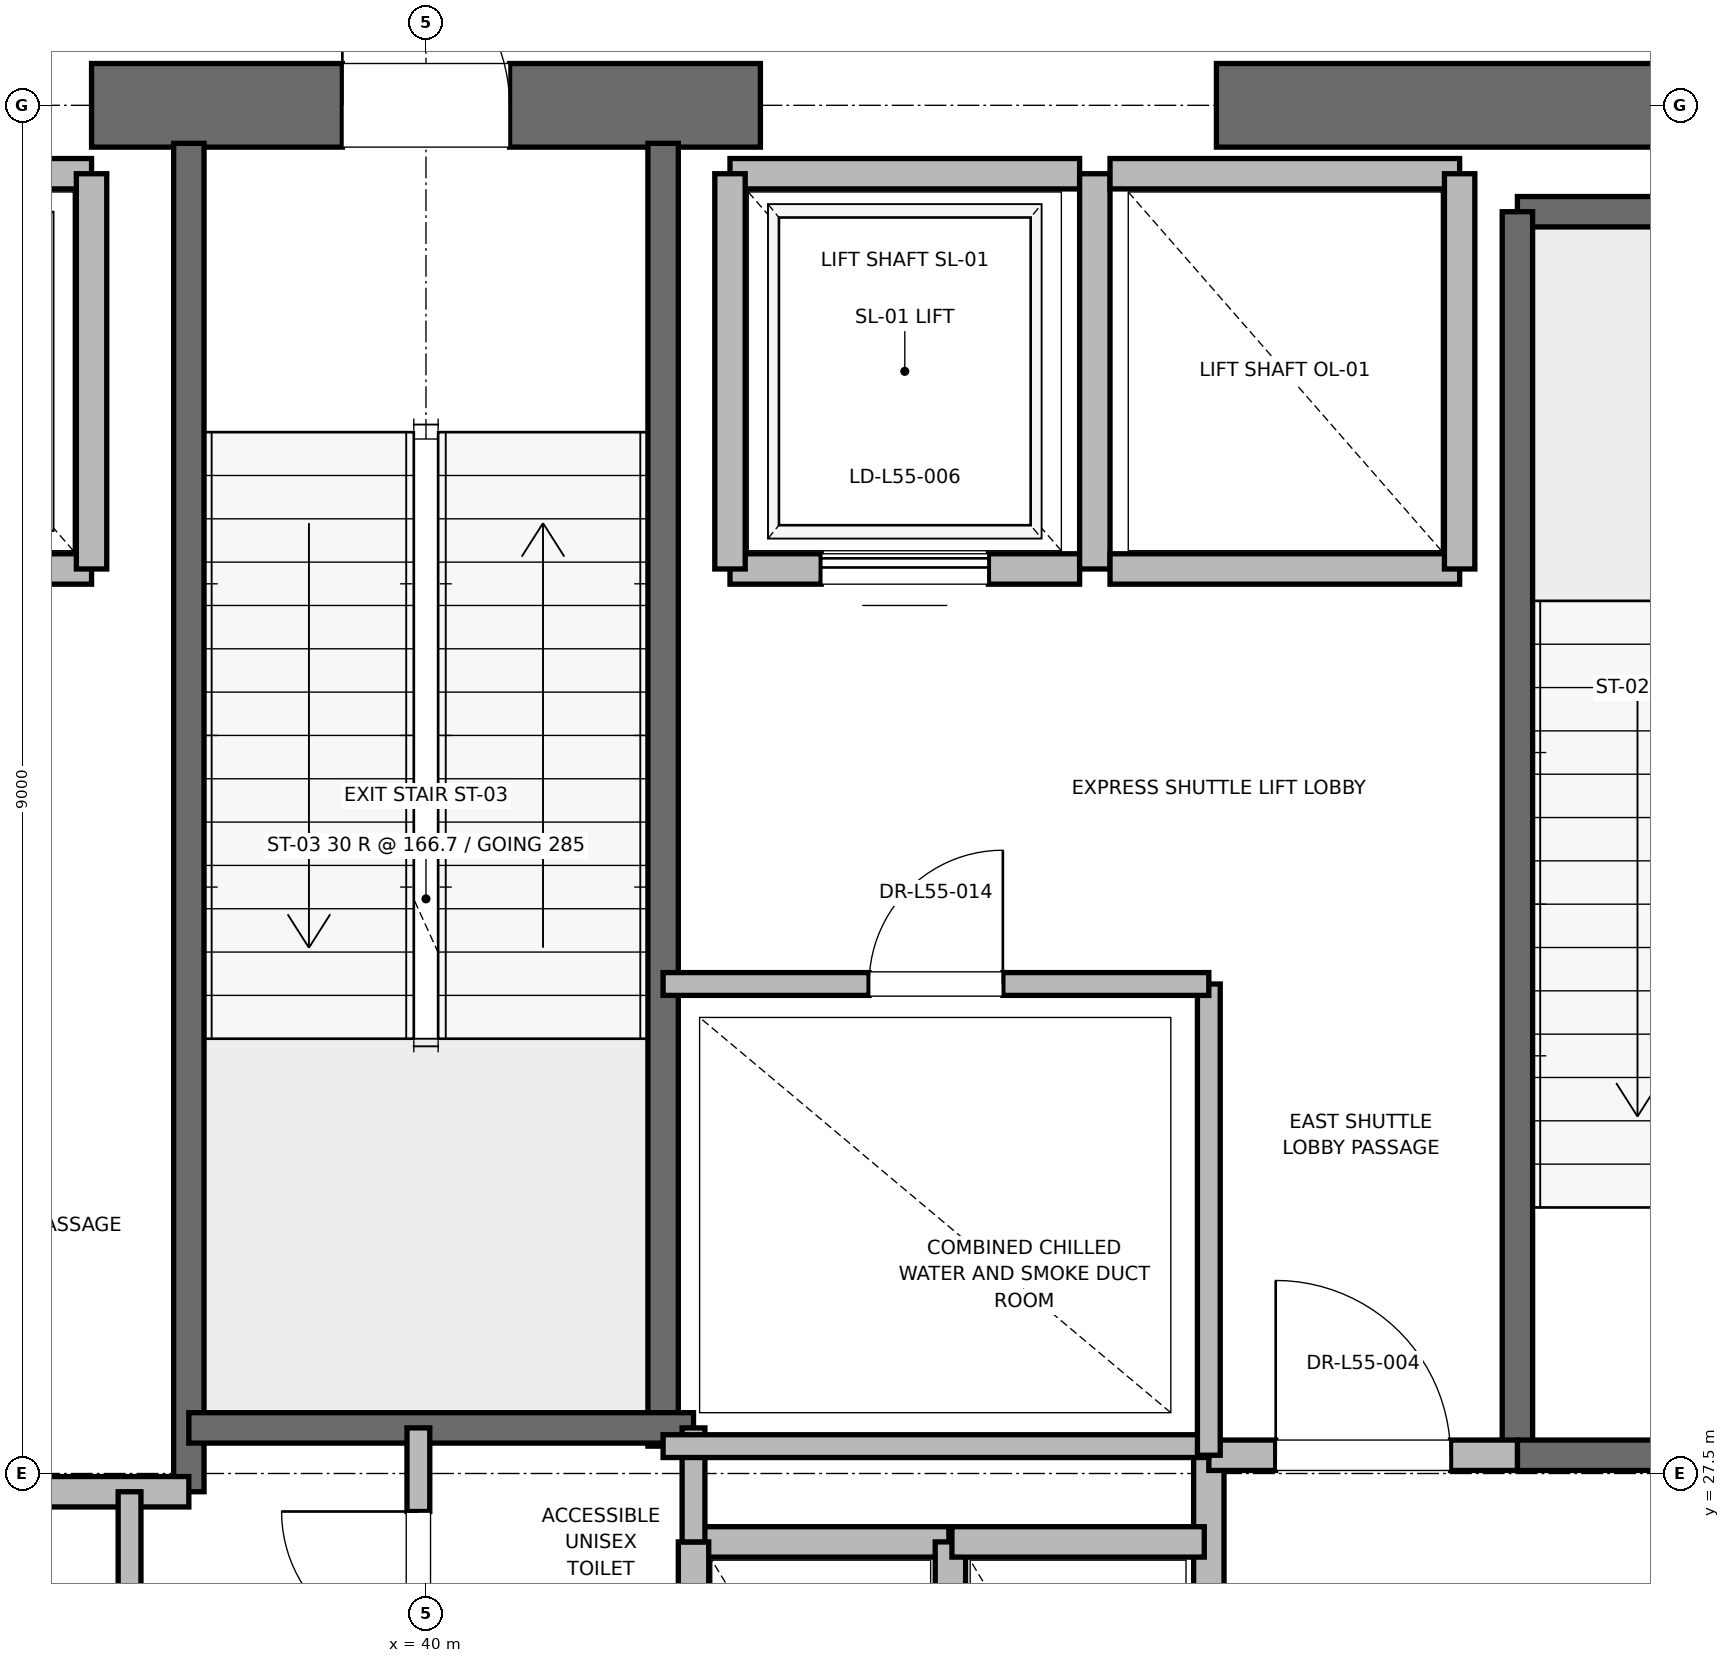
"""IFC4 building model, lengths in metres.
Left out: names, types, materials, properties, quantities, classifications, styles, units other than length and angle.
Written with IfcOpenShell. Run it as: python <this file> out.ifc"""

import sys

from ifc_helpers import new_model, si_unit, direction, frame, frame_2d, origin, place, context, subcontext, project, spatial, rectangle, extrude, element, fill, save


model = new_model("IFC4")
c1 = context("Model", 3, precision=1e-05, world=origin(), true_north=direction((0.0, 1.0)))
c2 = subcontext(c1, "Body", "Model", "MODEL_VIEW")
j1 = project(units=[si_unit("LENGTHUNIT", "METRE"), si_unit("PLANEANGLEUNIT", "RADIAN")], contexts=[c1])
p1 = place(None, origin())
s1 = spatial("IfcSite", under=j1, at=p1, CompositionType="ELEMENT")
p2 = place(p1, origin())
s2 = spatial("IfcBuilding", under=s1, at=p2, CompositionType="ELEMENT")
p3 = place(p2, frame((0.0, 0.0, 238.2)))
s3 = spatial("IfcBuildingStorey", under=s2, at=p3, CompositionType="ELEMENT", Elevation=238.2)
p4 = place(p3, frame((37.8, 36.5, 0.0), z_axis=(0.0, 0.0, 1.0), x_axis=(1.0, 0.0, 0.0)))
e1 = element("IfcWall", 1, at=p4, inside=s3, PredefinedType="SHEAR", context=c2, shape_type="SweptSolid", body=[
    extrude(rectangle(XDim=4.4, YDim=0.55, at=frame_2d((2.2, 0.0))), origin(), (0.0, 0.0, 1.0), 4.785),
])
p5 = place(p4, frame((1.65, 0.0, 0.0)))
e2 = element("IfcOpeningElement", 2, at=p5, cuts=e1, PredefinedType="OPENING", context=c2, shape_type="SweptSolid", body=[
    extrude(rectangle(XDim=1.1, YDim=2.15, at=frame_2d((0.55, 1.075))), frame((0.0, 0.275, 0.0), z_axis=(0.0, -1.0, 0.0), x_axis=(1.0, 0.0, 0.0)), (0.0, 0.0, 1.0), 0.55),
])
p6 = place(p3, frame((45.2, 36.5, 0.0), z_axis=(0.0, 0.0, 1.0), x_axis=(1.0, 0.0, 0.0)))
e3 = element("IfcWall", 3, at=p6, inside=s3, PredefinedType="SHEAR", context=c2, shape_type="SweptSolid", body=[
    extrude(rectangle(XDim=5.8, YDim=0.55, at=frame_2d((2.9, 0.0))), origin(), (0.0, 0.0, 1.0), 4.785),
])
p7 = place(p3, frame((47.18, 35.8, 0.0), z_axis=(0.0, 0.0, 1.0), x_axis=(1.0, 0.0, 0.0)))
e4 = element("IfcWall", 4, at=p7, inside=s3, PredefinedType="SOLIDWALL", context=c2, shape_type="SweptSolid", body=[
    extrude(rectangle(XDim=3.12, YDim=0.2, at=frame_2d((1.56, 0.0))), origin(), (0.0, 0.0, 1.0), 4.785),
])
p8 = place(p3, frame((47.18, 27.62, 0.0), z_axis=(0.0, 0.0, 1.0), x_axis=(0.0, 1.0, 0.0)))
e5 = element("IfcWall", 5, at=p8, inside=s3, PredefinedType="SOLIDWALL", context=c2, shape_type="SweptSolid", body=[
    extrude(rectangle(XDim=8.18, YDim=0.2, at=frame_2d((4.09, 0.0))), origin(), (0.0, 0.0, 1.0), 4.785),
])
p9 = place(p3, frame((47.18, 27.62, 0.0), z_axis=(0.0, 0.0, 1.0), x_axis=(1.0, 0.0, 0.0)))
e6 = element("IfcWall", 6, at=p9, inside=s3, PredefinedType="SOLIDWALL", context=c2, shape_type="SweptSolid", body=[
    extrude(rectangle(XDim=3.12, YDim=0.2, at=frame_2d((1.56, 0.0))), origin(), (0.0, 0.0, 1.0), 4.785),
])
p10 = place(p9, frame((1.01, 0.0, 0.0)))
e7 = element("IfcOpeningElement", 7, at=p10, cuts=e6, PredefinedType="OPENING", context=c2, shape_type="SweptSolid", body=[
    extrude(rectangle(XDim=1.1, YDim=2.15, at=frame_2d((0.55, 1.075))), frame((0.0, 0.1, 0.0), z_axis=(0.0, -1.0, 0.0), x_axis=(1.0, 0.0, 0.0)), (0.0, 0.0, 1.0), 0.2),
])
p11 = place(p3, frame((38.44, 27.38, 0.0), z_axis=(0.0, 0.0, 1.0), x_axis=(0.0, 1.0, 0.0)))
e8 = element("IfcWall", 8, at=p11, inside=s3, PredefinedType="SOLIDWALL", context=c2, shape_type="SweptSolid", body=[
    extrude(rectangle(XDim=8.87, YDim=0.2, at=frame_2d((4.435, 0.0))), origin(), (0.0, 0.0, 1.0), 4.785),
])
p12 = place(p3, frame((41.56, 27.68, 0.0), z_axis=(0.0, 0.0, 1.0), x_axis=(0.0, 1.0, 0.0)))
e9 = element("IfcWall", 9, at=p12, inside=s3, PredefinedType="SOLIDWALL", context=c2, shape_type="SweptSolid", body=[
    extrude(rectangle(XDim=8.57, YDim=0.2, at=frame_2d((4.285, 0.0))), origin(), (0.0, 0.0, 1.0), 4.785),
])
p13 = place(p3, frame((38.44, 27.8, 0.0), z_axis=(0.0, 0.0, 1.0), x_axis=(1.0, 0.0, 0.0)))
e10 = element("IfcWall", 10, at=p13, inside=s3, PredefinedType="SOLIDWALL", context=c2, shape_type="SweptSolid", body=[
    extrude(rectangle(XDim=3.32, YDim=0.2, at=frame_2d((1.66, 0.0))), origin(), (0.0, 0.0, 1.0), 4.785),
])
p14 = place(p3, frame((32.82, 27.38, 0.0), z_axis=(0.0, 0.0, 1.0), x_axis=(1.0, 0.0, 0.0)))
e11 = element("IfcWall", 11, at=p14, inside=s3, PredefinedType="PARTITIONING", context=c2, shape_type="SweptSolid", body=[
    extrude(rectangle(XDim=5.62, YDim=0.2, at=frame_2d((2.81, 0.0))), origin(), (0.0, 0.0, 1.0), 4.785),
])
p15 = place(p3, frame((45.15, 24.25, 0.0), z_axis=(0.0, 0.0, 1.0), x_axis=(0.0, 1.0, 0.0)))
e12 = element("IfcWall", 12, at=p15, inside=s3, PredefinedType="PARTITIONING", context=c2, shape_type="SweptSolid", body=[
    extrude(rectangle(XDim=3.37, YDim=0.2, at=frame_2d((1.685, 0.0))), origin(), (0.0, 0.0, 1.0), 4.785),
])
p16 = place(p3, frame((45.15, 27.62, 0.0), z_axis=(0.0, 0.0, 1.0), x_axis=(1.0, 0.0, 0.0)))
e13 = element("IfcWall", 13, at=p16, inside=s3, PredefinedType="PARTITIONING", context=c2, shape_type="SweptSolid", body=[
    extrude(rectangle(XDim=2.03, YDim=0.2, at=frame_2d((1.015, 0.0))), origin(), (0.0, 0.0, 1.0), 4.785),
])
p17 = place(p16, frame((0.44, 0.0, 0.0)))
e14 = element("IfcOpeningElement", 14, at=p17, cuts=e13, PredefinedType="OPENING", context=c2, shape_type="SweptSolid", body=[
    extrude(rectangle(XDim=1.15, YDim=2.2, at=frame_2d((0.575, 1.1))), frame((0.0, 0.1, 0.0), z_axis=(0.0, -1.0, 0.0), x_axis=(1.0, 0.0, 0.0)), (0.0, 0.0, 1.0), 0.2),
])
p18 = place(p3, frame((43.44, 27.05, 0.0), z_axis=(0.0, 0.0, 1.0), x_axis=(-1.0, 0.0, 0.0)))
e15 = element("IfcWall", 15, at=p18, inside=s3, PredefinedType="SOLIDWALL", context=c2, shape_type="SweptSolid", body=[
    extrude(rectangle(XDim=1.68, YDim=0.2, at=frame_2d((0.84, 0.0))), origin(), (0.0, 0.0, 1.0), 4.785),
])
for number, where, z_axis, x_axis in (
    (16, (41.76, 27.05, 0.0), (0.0, 0.0, 1.0), (0.0, -1.0, 0.0)),
    (17, (43.45, 24.45, 0.0), (0.0, 0.0, 1.0), (0.0, 1.0, 0.0)),
):
    element("IfcWall", number, at=place(p3, frame(where, z_axis=z_axis, x_axis=x_axis)), inside=s3, PredefinedType="SOLIDWALL", context=c2, shape_type="SweptSolid", body=[
        extrude(rectangle(XDim=2.6, YDim=0.2, at=frame_2d((1.3, 0.0))), origin(), (0.0, 0.0, 1.0), 4.785),
    ])
p19 = place(p3, frame((45.12, 27.05, 0.0), z_axis=(0.0, 0.0, 1.0), x_axis=(-1.0, 0.0, 0.0)))
e18 = element("IfcWall", 18, at=p19, inside=s3, PredefinedType="SOLIDWALL", context=c2, shape_type="SweptSolid", body=[
    extrude(rectangle(XDim=1.66, YDim=0.2, at=frame_2d((0.83, 0.0))), origin(), (0.0, 0.0, 1.0), 4.785),
])
p20 = place(p3, frame((35.5, 33.45, 0.0), z_axis=(0.0, 0.0, 1.0), x_axis=(1.0, 0.0, 0.0)))
e19 = element("IfcWall", 19, at=p20, inside=s3, PredefinedType="SOLIDWALL", context=c2, shape_type="SweptSolid", body=[
    extrude(rectangle(XDim=2.3, YDim=0.2, at=frame_2d((1.15, 0.0))), origin(), (0.0, 0.0, 1.0), 4.785),
])
p21 = place(p20, frame((0.6, 0.0, 0.0)))
e20 = element("IfcOpeningElement", 20, at=p21, cuts=e19, PredefinedType="OPENING", context=c2, shape_type="SweptSolid", body=[
    extrude(rectangle(XDim=1.1, YDim=2.2, at=frame_2d((0.55, 1.1))), frame((0.0, 0.1, 0.0), z_axis=(0.0, -1.0, 0.0), x_axis=(1.0, 0.0, 0.0)), (0.0, 0.0, 1.0), 0.2),
])
p22 = place(p3, frame((37.8, 36.05, 0.0), z_axis=(0.0, 0.0, 1.0), x_axis=(-1.0, 0.0, 0.0)))
e21 = element("IfcWall", 21, at=p22, inside=s3, PredefinedType="SOLIDWALL", context=c2, shape_type="SweptSolid", body=[
    extrude(rectangle(XDim=2.3, YDim=0.2, at=frame_2d((1.15, 0.0))), origin(), (0.0, 0.0, 1.0), 3.765),
])
p23 = place(p3, frame((37.8, 33.45, 0.0), z_axis=(0.0, 0.0, 1.0), x_axis=(0.0, 1.0, 0.0)))
e22 = element("IfcWall", 22, at=p23, inside=s3, PredefinedType="SOLIDWALL", context=c2, shape_type="SweptSolid", body=[
    extrude(rectangle(XDim=2.6, YDim=0.2, at=frame_2d((1.3, 0.0))), origin(), (0.0, 0.0, 1.0), 3.765),
])
p24 = place(p3, frame((42.0, 33.45, 0.0), z_axis=(0.0, 0.0, 1.0), x_axis=(1.0, 0.0, 0.0)))
e23 = element("IfcWall", 23, at=p24, inside=s3, PredefinedType="SOLIDWALL", context=c2, shape_type="SweptSolid", body=[
    extrude(rectangle(XDim=2.3, YDim=0.2, at=frame_2d((1.15, 0.0))), origin(), (0.0, 0.0, 1.0), 4.785),
])
p25 = place(p24, frame((0.6, 0.0, 0.0)))
e24 = element("IfcOpeningElement", 24, at=p25, cuts=e23, PredefinedType="OPENING", context=c2, shape_type="SweptSolid", body=[
    extrude(rectangle(XDim=1.1, YDim=2.2, at=frame_2d((0.55, 1.1))), frame((0.0, 0.1, 0.0), z_axis=(0.0, -1.0, 0.0), x_axis=(1.0, 0.0, 0.0)), (0.0, 0.0, 1.0), 0.2),
])
p26 = place(p3, frame((44.3, 36.05, 0.0), z_axis=(0.0, 0.0, 1.0), x_axis=(-1.0, 0.0, 0.0)))
e25 = element("IfcWall", 25, at=p26, inside=s3, PredefinedType="SOLIDWALL", context=c2, shape_type="SweptSolid", body=[
    extrude(rectangle(XDim=2.3, YDim=0.2, at=frame_2d((1.15, 0.0))), origin(), (0.0, 0.0, 1.0), 3.765),
])
for number, where, z_axis, x_axis in (
    (26, (42.0, 36.05, 0.0), (0.0, 0.0, 1.0), (0.0, -1.0, 0.0)),
    (27, (44.4, 33.45, 0.0), (0.0, 0.0, 1.0), (0.0, 1.0, 0.0)),
):
    element("IfcWall", number, at=place(p3, frame(where, z_axis=z_axis, x_axis=x_axis)), inside=s3, PredefinedType="SOLIDWALL", context=c2, shape_type="SweptSolid", body=[
        extrude(rectangle(XDim=2.6, YDim=0.2, at=frame_2d((1.3, 0.0))), origin(), (0.0, 0.0, 1.0), 3.765),
    ])
p27 = place(p3, frame((44.5, 33.45, 0.0), z_axis=(0.0, 0.0, 1.0), x_axis=(1.0, 0.0, 0.0)))
e28 = element("IfcWall", 28, at=p27, inside=s3, PredefinedType="SOLIDWALL", context=c2, shape_type="SweptSolid", body=[
    extrude(rectangle(XDim=2.3, YDim=0.2, at=frame_2d((1.15, 0.0))), origin(), (0.0, 0.0, 1.0), 4.785),
])
p28 = place(p3, frame((46.8, 36.05, 0.0), z_axis=(0.0, 0.0, 1.0), x_axis=(-1.0, 0.0, 0.0)))
e29 = element("IfcWall", 29, at=p28, inside=s3, PredefinedType="SOLIDWALL", context=c2, shape_type="SweptSolid", body=[
    extrude(rectangle(XDim=2.3, YDim=0.2, at=frame_2d((1.15, 0.0))), origin(), (0.0, 0.0, 1.0), 3.765),
])
p29 = place(p3, frame((46.8, 33.45, 0.0), z_axis=(0.0, 0.0, 1.0), x_axis=(0.0, 1.0, 0.0)))
e30 = element("IfcWall", 30, at=p29, inside=s3, PredefinedType="SOLIDWALL", context=c2, shape_type="SweptSolid", body=[
    extrude(rectangle(XDim=2.6, YDim=0.2, at=frame_2d((1.3, 0.0))), origin(), (0.0, 0.0, 1.0), 4.785),
])
p30 = place(p3, frame((41.76, 27.05, 0.0), z_axis=(0.0, 0.0, 1.0), x_axis=(0.0, 1.0, 0.0)))
e31 = element("IfcWall", 31, at=p30, inside=s3, PredefinedType="PARTITIONING", context=c2, shape_type="SweptSolid", body=[
    extrude(rectangle(XDim=0.75, YDim=0.15, at=frame_2d((0.375, 0.0))), origin(), (0.0, 0.0, 1.0), 2.85),
])
p31 = place(p3, frame((39.95, 25.8, 0.0), z_axis=(0.0, 0.0, 1.0), x_axis=(0.0, 1.0, 0.0)))
e32 = element("IfcWall", 32, at=p31, inside=s3, PredefinedType="PARTITIONING", context=c2, shape_type="SweptSolid", body=[
    extrude(rectangle(XDim=2.0, YDim=0.15, at=frame_2d((1.0, 0.0))), origin(), (0.0, 0.0, 1.0), 2.85),
])
p32 = place(p31, frame((0.55, 0.0, 0.0)))
e33 = element("IfcOpeningElement", 33, at=p32, cuts=e32, PredefinedType="OPENING", context=c2, shape_type="SweptSolid", body=[
    extrude(rectangle(XDim=0.9, YDim=2.1, at=frame_2d((0.45, 1.05))), frame((0.0, 0.075, 0.0), z_axis=(0.0, -1.0, 0.0), x_axis=(1.0, 0.0, 0.0)), (0.0, 0.0, 1.0), 0.15),
])
p33 = place(p3, frame((38.05, 18.6, 0.0), z_axis=(0.0, 0.0, 1.0), x_axis=(0.0, 1.0, 0.0)))
e34 = element("IfcWall", 34, at=p33, inside=s3, PredefinedType="PARTITIONING", context=c2, shape_type="SweptSolid", body=[
    extrude(rectangle(XDim=8.78, YDim=0.15, at=frame_2d((4.39, 0.0))), origin(), (0.0, 0.0, 1.0), 2.85),
])
p34 = place(p33, frame((3.89, 0.0, 0.0)))
e35 = element("IfcOpeningElement", 35, at=p34, cuts=e34, PredefinedType="OPENING", context=c2, shape_type="SweptSolid", body=[
    extrude(rectangle(XDim=1.0, YDim=2.15, at=frame_2d((0.5, 1.075))), frame((0.0, 0.075, 0.0), z_axis=(0.0, -1.0, 0.0), x_axis=(1.0, 0.0, 0.0)), (0.0, 0.0, 1.0), 0.15),
])
p35 = place(p3, frame((41.56, 27.68, 0.0), z_axis=(0.0, 0.0, 1.0), x_axis=(1.0, 0.0, 0.0)))
e36 = element("IfcWall", 36, at=p35, inside=s3, PredefinedType="PARTITIONING", context=c2, shape_type="SweptSolid", body=[
    extrude(rectangle(XDim=3.59, YDim=0.15, at=frame_2d((1.795, 0.0))), origin(), (0.0, 0.0, 1.0), 2.85),
])
p36 = place(p3, frame((45.15, 27.62, 0.0), z_axis=(0.0, 0.0, 1.0), x_axis=(0.0, 1.0, 0.0)))
e37 = element("IfcWall", 37, at=p36, inside=s3, PredefinedType="PARTITIONING", context=c2, shape_type="SweptSolid", body=[
    extrude(rectangle(XDim=3.1, YDim=0.15, at=frame_2d((1.55, 0.0))), origin(), (0.0, 0.0, 1.0), 2.85),
])
p37 = place(p3, frame((41.56, 30.72, 0.0), z_axis=(0.0, 0.0, 1.0), x_axis=(1.0, 0.0, 0.0)))
e38 = element("IfcWall", 38, at=p37, inside=s3, PredefinedType="PARTITIONING", context=c2, shape_type="SweptSolid", body=[
    extrude(rectangle(XDim=3.59, YDim=0.15, at=frame_2d((1.795, 0.0))), origin(), (0.0, 0.0, 1.0), 2.85),
])
p38 = place(p37, frame((1.355, 0.0, 0.0)))
e39 = element("IfcOpeningElement", 39, at=p38, cuts=e38, PredefinedType="OPENING", context=c2, shape_type="SweptSolid", body=[
    extrude(rectangle(XDim=0.88, YDim=2.1, at=frame_2d((0.44, 1.05))), frame((0.0, 0.075, 0.0), z_axis=(0.0, -1.0, 0.0), x_axis=(1.0, 0.0, 0.0)), (0.0, 0.0, 1.0), 0.15),
])
p39 = place(p5, origin())
e40 = element("IfcDoor", 40, at=p39, inside=s3, OperationType="SINGLE_SWING_LEFT", PredefinedType="DOOR", context=c2, shape_type="SweptSolid", body=[
    extrude(rectangle(XDim=1.1, YDim=2.15, at=frame_2d((0.55, 1.075))), frame((0.0, 0.025, 0.0), z_axis=(0.0, -1.0, 0.0), x_axis=(1.0, 0.0, 0.0)), (0.0, 0.0, 1.0), 0.05),
])
fill(e2, e40)
p40 = place(p17, origin())
e41 = element("IfcDoor", 41, at=p40, inside=s3, OperationType="SINGLE_SWING_LEFT", PredefinedType="DOOR", context=c2, shape_type="SweptSolid", body=[
    extrude(rectangle(XDim=1.15, YDim=2.2, at=frame_2d((0.575, 1.1))), frame((0.0, 0.025, 0.0), z_axis=(0.0, -1.0, 0.0), x_axis=(1.0, 0.0, 0.0)), (0.0, 0.0, 1.0), 0.05),
])
fill(e14, e41)
p41 = place(p25, origin())
e42 = element("IfcDoor", 42, at=p41, inside=s3, OperationType="SLIDING_TO_RIGHT", PredefinedType="DOOR", context=c2, shape_type="SweptSolid", body=[
    extrude(rectangle(XDim=1.1, YDim=2.2, at=frame_2d((0.55, 1.1))), frame((0.0, 0.025, 0.0), z_axis=(0.0, -1.0, 0.0), x_axis=(1.0, 0.0, 0.0)), (0.0, 0.0, 1.0), 0.05),
])
fill(e24, e42)
p42 = place(p32, origin())
e43 = element("IfcDoor", 43, at=p42, inside=s3, OperationType="SINGLE_SWING_RIGHT", PredefinedType="DOOR", context=c2, shape_type="SweptSolid", body=[
    extrude(rectangle(XDim=0.9, YDim=2.1, at=frame_2d((0.45, 1.05))), frame((0.0, 0.025, 0.0), z_axis=(0.0, -1.0, 0.0), x_axis=(1.0, 0.0, 0.0)), (0.0, 0.0, 1.0), 0.05),
])
fill(e33, e43)
p43 = place(p38, origin())
e44 = element("IfcDoor", 44, at=p43, inside=s3, OperationType="SINGLE_SWING_RIGHT", PredefinedType="DOOR", context=c2, shape_type="SweptSolid", body=[
    extrude(rectangle(XDim=0.88, YDim=2.1, at=frame_2d((0.44, 1.05))), frame((0.0, 0.025, 0.0), z_axis=(0.0, -1.0, 0.0), x_axis=(1.0, 0.0, 0.0)), (0.0, 0.0, 1.0), 0.05),
])
fill(e39, e44)
save(model, sys.argv[1])
